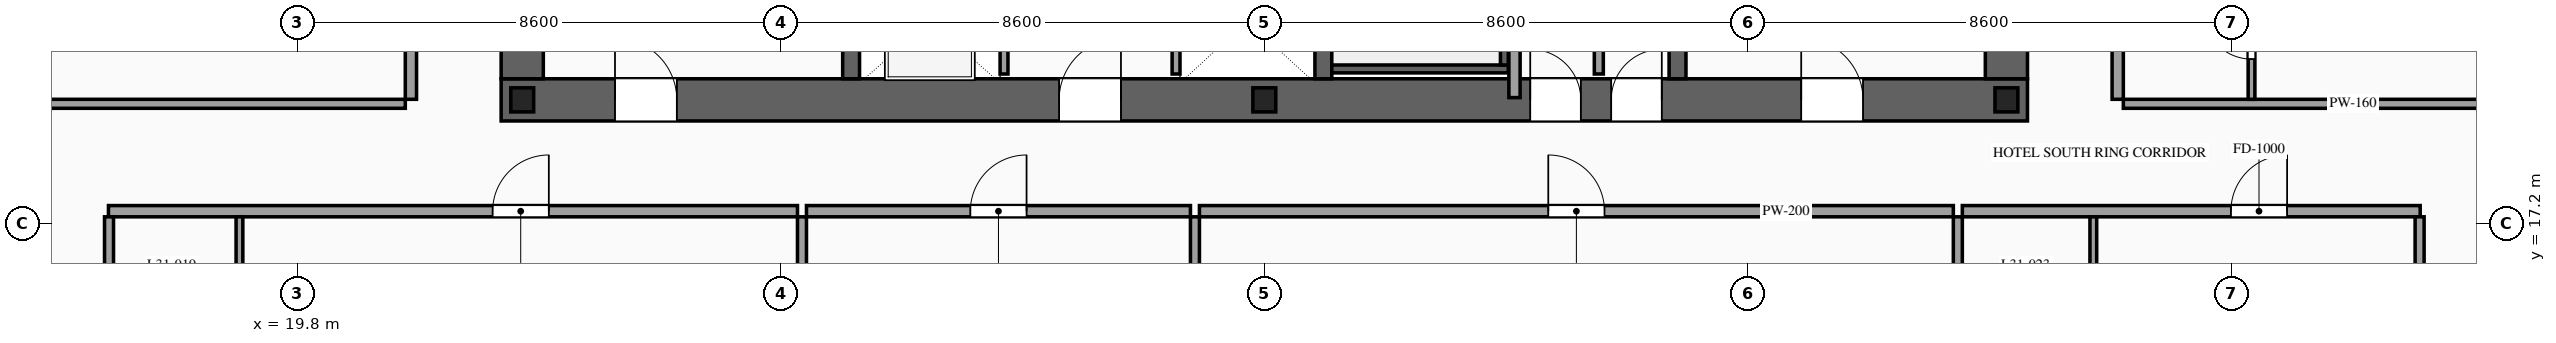
"""IFC4 building model, lengths in metres.
Left out: names, types, materials, properties, quantities, classifications, styles, units other than length and angle.
Written with IfcOpenShell. Run it as: python <this file> out.ifc"""

import sys

from ifc_helpers import new_model, si_unit, direction, frame, frame_2d, origin, origin_2d, place, context, subcontext, project, spatial, rectangle, i_section, extrude, source, transform, mapped, element, fill, save


model = new_model("IFC4")
c1 = context("Model", 3, precision=1e-05, world=origin(), true_north=direction((0.0, 1.0)))
c2 = subcontext(c1, "Body", "Model", "MODEL_VIEW")
j1 = project(units=[si_unit("LENGTHUNIT", "METRE"), si_unit("PLANEANGLEUNIT", "RADIAN")], contexts=[c1])
p1 = place(None, origin())
s1 = spatial("IfcSite", under=j1, at=p1, CompositionType="ELEMENT")
p2 = place(p1, origin())
s2 = spatial("IfcBuilding", under=s1, at=p2, CompositionType="ELEMENT")
p3 = place(p2, frame((0.0, 0.0, 119.0)))
s3 = spatial("IfcBuildingStorey", under=s2, at=p3, CompositionType="ELEMENT", Elevation=119.0)
p4 = place(p3, frame((23.425, 19.4, 0.0), z_axis=(0.0, 0.0, 1.0), x_axis=(1.0, 0.0, 0.0)))
e1 = element("IfcWall", 1, at=p4, inside=s3, PredefinedType="SHEAR", context=c2, shape_type="SweptSolid", body=[
    extrude(rectangle(XDim=27.15, YDim=0.75, at=frame_2d((13.575, 0.0))), origin(), (0.0, 0.0, 1.0), 3.6),
])
p5 = place(p4, frame((2.025, 0.0, 0.0)))
e2 = element("IfcOpeningElement", 2, at=p5, cuts=e1, PredefinedType="OPENING", context=c2, shape_type="SweptSolid", body=[
    extrude(rectangle(XDim=1.1, YDim=2.2, at=frame_2d((0.55, 1.1))), frame((0.0, 0.39, 0.0), z_axis=(0.0, -1.0, 0.0), x_axis=(1.0, 0.0, 0.0)), (0.0, 0.0, 1.0), 0.78),
])
p6 = place(p4, frame((9.925, 0.0, 0.0)))
e3 = element("IfcOpeningElement", 3, at=p6, cuts=e1, PredefinedType="OPENING", context=c2, shape_type="SweptSolid", body=[
    extrude(rectangle(XDim=1.1, YDim=2.2, at=frame_2d((0.55, 1.1))), frame((0.0, 0.39, 0.0), z_axis=(0.0, -1.0, 0.0), x_axis=(1.0, 0.0, 0.0)), (0.0, 0.0, 1.0), 0.78),
])
p7 = place(p4, frame((23.125, 0.0, 0.0)))
e4 = element("IfcOpeningElement", 4, at=p7, cuts=e1, PredefinedType="OPENING", context=c2, shape_type="SweptSolid", body=[
    extrude(rectangle(XDim=1.1, YDim=2.2, at=frame_2d((0.55, 1.1))), frame((0.0, 0.39, 0.0), z_axis=(0.0, -1.0, 0.0), x_axis=(1.0, 0.0, 0.0)), (0.0, 0.0, 1.0), 0.78),
])
p8 = place(p4, frame((19.745, 0.0, 0.0)))
e5 = element("IfcOpeningElement", 5, at=p8, cuts=e1, PredefinedType="OPENING", context=c2, shape_type="SweptSolid", body=[
    extrude(rectangle(XDim=0.9, YDim=2.15, at=frame_2d((0.45, 1.075))), frame((0.0, 0.39, 0.0), z_axis=(0.0, -1.0, 0.0), x_axis=(1.0, 0.0, 0.0)), (0.0, 0.0, 1.0), 0.78),
])
p9 = place(p4, frame((18.305, 0.0, 0.0)))
e6 = element("IfcOpeningElement", 6, at=p9, cuts=e1, PredefinedType="OPENING", context=c2, shape_type="SweptSolid", body=[
    extrude(rectangle(XDim=0.9, YDim=2.15, at=frame_2d((0.45, 1.075))), frame((0.0, 0.39, 0.0), z_axis=(0.0, -1.0, 0.0), x_axis=(1.0, 0.0, 0.0)), (0.0, 0.0, 1.0), 0.78),
])
m1 = source(origin(), c2, "Body", "SweptSolid", [
    extrude(rectangle(XDim=12.05, YDim=0.75, at=frame_2d((6.025, 0.0))), origin(), (0.0, 0.0, 1.0), 3.6),
])
for number, where, z_axis, x_axis in (
    (7, (23.8, 19.775, 0.0), (0.0, 0.0, 1.0), (0.0, 1.0, 0.0)),
    (8, (50.2, 19.775, 0.0), (0.0, 0.0, 1.0), (0.0, 1.0, 0.0)),
):
    element("IfcWall", number, at=place(p3, frame(where, z_axis=z_axis, x_axis=x_axis)), inside=s3, PredefinedType="SHEAR", context=c2, shape_type="MappedRepresentation", body=[
        mapped(m1, transform((0.0, 0.0, 0.0), scale=1.0)),
    ])
m2 = source(origin(), c2, "Body", "SweptSolid", [
    extrude(rectangle(XDim=12.05, YDim=0.3, at=frame_2d((6.025, 0.0))), origin(), (0.0, 0.0, 1.0), 3.6),
])
for number, where, z_axis, x_axis in (
    (9, (29.65, 19.775, 0.0), (0.0, 0.0, 1.0), (0.0, 1.0, 0.0)),
    (10, (38.05, 19.775, 0.0), (0.0, 0.0, 1.0), (0.0, 1.0, 0.0)),
    (11, (44.35, 19.775, 0.0), (0.0, 0.0, 1.0), (0.0, 1.0, 0.0)),
):
    element("IfcWall", number, at=place(p3, frame(where, z_axis=z_axis, x_axis=x_axis)), inside=s3, PredefinedType="SOLIDWALL", context=c2, shape_type="MappedRepresentation", body=[
        mapped(m2, transform((0.0, 0.0, 0.0), scale=1.0)),
    ])
m3 = source(origin(), c2, "Body", "SweptSolid", [
    extrude(i_section(OverallWidth=0.407, OverallDepth=0.428, WebThickness=0.02, FlangeThickness=0.035, at=origin_2d()), origin(), (0.0, 0.0, 1.0), 3.6),
])
for number, where, z_axis, x_axis in (
    (12, (23.8, 19.4, 0.0), (0.0, 0.0, 1.0), (1.0, 0.0, 0.0)),
    (13, (37.0, 19.4, 0.0), (0.0, 0.0, 1.0), (1.0, 0.0, 0.0)),
    (14, (50.2, 19.4, 0.0), (0.0, 0.0, 1.0), (1.0, 0.0, 0.0)),
):
    element("IfcColumn", number, at=place(p3, frame(where, z_axis=z_axis, x_axis=x_axis)), inside=s3, PredefinedType="COLUMN", context=c2, shape_type="MappedRepresentation", body=[
        mapped(m3, transform((0.0, 0.0, 0.0), scale=1.0)),
    ])
p10 = place(p3, frame((32.37, 19.86, 0.0), z_axis=(0.0, 0.0, 1.0), x_axis=(0.0, 1.0, 0.0)))
e15 = element("IfcWall", 15, at=p10, inside=s3, PredefinedType="SOLIDWALL", context=c2, shape_type="SweptSolid", body=[
    extrude(rectangle(XDim=2.04, YDim=0.14, at=frame_2d((1.02, 0.0))), origin(), (0.0, 0.0, 1.0), 3.38),
])
p11 = place(p10, frame((0.47, 0.0, 0.0)))
e16 = element("IfcOpeningElement", 16, at=p11, cuts=e15, PredefinedType="OPENING", context=c2, shape_type="SweptSolid", body=[
    extrude(rectangle(XDim=1.1, YDim=2.2, at=frame_2d((0.55, 1.1))), frame((0.0, 0.085, 0.0), z_axis=(0.0, -1.0, 0.0), x_axis=(1.0, 0.0, 0.0)), (0.0, 0.0, 1.0), 0.17),
])
m4 = source(origin(), c2, "Body", "SweptSolid", [
    extrude(rectangle(XDim=2.04, YDim=0.14, at=frame_2d((1.02, 0.0))), origin(), (0.0, 0.0, 1.0), 3.38),
])
p12 = place(p3, frame((35.43, 19.86, 0.0), z_axis=(0.0, 0.0, 1.0), x_axis=(0.0, 1.0, 0.0)))
e17 = element("IfcWall", 17, at=p12, inside=s3, PredefinedType="SOLIDWALL", context=c2, shape_type="MappedRepresentation", body=[
    mapped(m4, transform((0.0, 0.0, 0.0), scale=1.0)),
])
m5 = source(origin(), c2, "Body", "SweptSolid", [
    extrude(rectangle(XDim=3.14, YDim=0.14, at=frame_2d((1.57, 0.0))), origin(), (0.0, 0.0, 1.0), 3.38),
])
p13 = place(p3, frame((38.2, 19.95, 0.0), z_axis=(0.0, 0.0, 1.0), x_axis=(1.0, 0.0, 0.0)))
e18 = element("IfcWall", 18, at=p13, inside=s3, PredefinedType="SOLIDWALL", context=c2, shape_type="MappedRepresentation", body=[
    mapped(m5, transform((0.0, 0.0, 0.0), scale=1.0)),
])
m6 = source(origin(), c2, "Body", "SweptSolid", [
    extrude(rectangle(XDim=8.94, YDim=0.14, at=frame_2d((4.47, 0.0))), origin(), (0.0, 0.0, 1.0), 3.38),
])
p14 = place(p3, frame((41.27, 20.02, 0.0), z_axis=(0.0, 0.0, 1.0), x_axis=(0.0, 1.0, 0.0)))
e19 = element("IfcWall", 19, at=p14, inside=s3, PredefinedType="SOLIDWALL", context=c2, shape_type="MappedRepresentation", body=[
    mapped(m6, transform((0.0, 0.0, 0.0), scale=1.0)),
])
m7 = source(origin(), c2, "Body", "SweptSolid", [
    extrude(rectangle(XDim=1.34, YDim=0.16, at=frame_2d((0.67, 0.0))), origin(), (0.0, 0.0, 1.0), 3.38),
])
p15 = place(p3, frame((42.95, 19.86, 0.0), z_axis=(0.0, 0.0, 1.0), x_axis=(0.0, 1.0, 0.0)))
e20 = element("IfcWall", 20, at=p15, inside=s3, PredefinedType="PARTITIONING", context=c2, shape_type="MappedRepresentation", body=[
    mapped(m7, transform((0.0, 0.0, 0.0), scale=1.0)),
])
m8 = source(origin(), c2, "Body", "SweptSolid", [
    extrude(rectangle(XDim=6.51, YDim=0.2, at=frame_2d((3.255, 0.0))), origin(), (0.0, 0.0, 1.0), 3.38),
])
p16 = place(p3, frame((41.45, 19.44, 0.0), z_axis=(0.0, 0.0, 1.0), x_axis=(0.0, 1.0, 0.0)))
e21 = element("IfcWall", 21, at=p16, inside=s3, PredefinedType="PARTITIONING", context=c2, shape_type="MappedRepresentation", body=[
    mapped(m8, transform((0.0, 0.0, 0.0), scale=1.0)),
])
p17 = place(p3, frame((16.44, 17.42, 0.0), z_axis=(0.0, 0.0, 1.0), x_axis=(1.0, 0.0, 0.0)))
e22 = element("IfcWall", 22, at=p17, inside=s3, PredefinedType="PARTITIONING", context=c2, shape_type="SweptSolid", body=[
    extrude(rectangle(XDim=12.256, YDim=0.2, at=frame_2d((6.128, 0.0))), origin(), (0.0, 0.0, 1.0), 3.38),
])
p18 = place(p17, frame((6.833, 0.0, 0.0)))
e23 = element("IfcOpeningElement", 23, at=p18, cuts=e22, PredefinedType="OPENING", context=c2, shape_type="SweptSolid", body=[
    extrude(rectangle(XDim=1.0, YDim=2.2, at=frame_2d((0.5, 1.1))), frame((0.0, 0.115, 0.0), z_axis=(0.0, -1.0, 0.0), x_axis=(1.0, 0.0, 0.0)), (0.0, 0.0, 1.0), 0.23),
])
m9 = source(origin(), c2, "Body", "SweptSolid", [
    extrude(rectangle(XDim=14.97, YDim=0.16, at=frame_2d((7.485, 0.0))), origin(), (0.0, 0.0, 1.0), 3.38),
])
p19 = place(p3, frame((28.776, 2.35, 0.0), z_axis=(0.0, 0.0, 1.0), x_axis=(0.0, 1.0, 0.0)))
e24 = element("IfcWall", 24, at=p19, inside=s3, PredefinedType="PARTITIONING", context=c2, shape_type="MappedRepresentation", body=[
    mapped(m9, transform((0.0, 0.0, 0.0), scale=1.0)),
])
m10 = source(origin(), c2, "Body", "SweptSolid", [
    extrude(rectangle(XDim=2.42, YDim=0.12, at=frame_2d((1.21, 0.0))), origin(), (0.0, 0.0, 1.0), 3.38),
])
p20 = place(p3, frame((18.77, 14.9, 0.0), z_axis=(0.0, 0.0, 1.0), x_axis=(0.0, 1.0, 0.0)))
e25 = element("IfcWall", 25, at=p20, inside=s3, PredefinedType="PARTITIONING", context=c2, shape_type="MappedRepresentation", body=[
    mapped(m10, transform((0.0, 0.0, 0.0), scale=1.0)),
])
p21 = place(p3, frame((28.856, 17.42, 0.0), z_axis=(0.0, 0.0, 1.0), x_axis=(1.0, 0.0, 0.0)))
e26 = element("IfcWall", 26, at=p21, inside=s3, PredefinedType="PARTITIONING", context=c2, shape_type="SweptSolid", body=[
    extrude(rectangle(XDim=6.83, YDim=0.2, at=frame_2d((3.415, 0.0))), origin(), (0.0, 0.0, 1.0), 3.38),
])
p22 = place(p21, frame((2.915, 0.0, 0.0)))
e27 = element("IfcOpeningElement", 27, at=p22, cuts=e26, PredefinedType="OPENING", context=c2, shape_type="SweptSolid", body=[
    extrude(rectangle(XDim=1.0, YDim=2.2, at=frame_2d((0.5, 1.1))), frame((0.0, 0.115, 0.0), z_axis=(0.0, -1.0, 0.0), x_axis=(1.0, 0.0, 0.0)), (0.0, 0.0, 1.0), 0.23),
])
p23 = place(p3, frame((35.766, 2.35, 0.0), z_axis=(0.0, 0.0, 1.0), x_axis=(0.0, 1.0, 0.0)))
e28 = element("IfcWall", 28, at=p23, inside=s3, PredefinedType="PARTITIONING", context=c2, shape_type="MappedRepresentation", body=[
    mapped(m9, transform((0.0, 0.0, 0.0), scale=1.0)),
])
p24 = place(p3, frame((35.846, 17.42, 0.0), z_axis=(0.0, 0.0, 1.0), x_axis=(1.0, 0.0, 0.0)))
e29 = element("IfcWall", 29, at=p24, inside=s3, PredefinedType="PARTITIONING", context=c2, shape_type="SweptSolid", body=[
    extrude(rectangle(XDim=13.41, YDim=0.2, at=frame_2d((6.705, 0.0))), origin(), (0.0, 0.0, 1.0), 3.38),
])
p25 = place(p24, frame((6.205, 0.0, 0.0)))
e30 = element("IfcOpeningElement", 30, at=p25, cuts=e29, PredefinedType="OPENING", context=c2, shape_type="SweptSolid", body=[
    extrude(rectangle(XDim=1.0, YDim=2.2, at=frame_2d((0.5, 1.1))), frame((0.0, 0.115, 0.0), z_axis=(0.0, -1.0, 0.0), x_axis=(1.0, 0.0, 0.0)), (0.0, 0.0, 1.0), 0.23),
])
p26 = place(p3, frame((49.336, 2.35, 0.0), z_axis=(0.0, 0.0, 1.0), x_axis=(0.0, 1.0, 0.0)))
e31 = element("IfcWall", 31, at=p26, inside=s3, PredefinedType="PARTITIONING", context=c2, shape_type="MappedRepresentation", body=[
    mapped(m9, transform((0.0, 0.0, 0.0), scale=1.0)),
])
p27 = place(p3, frame((49.416, 17.42, 0.0), z_axis=(0.0, 0.0, 1.0), x_axis=(1.0, 0.0, 0.0)))
e32 = element("IfcWall", 32, at=p27, inside=s3, PredefinedType="PARTITIONING", context=c2, shape_type="SweptSolid", body=[
    extrude(rectangle(XDim=8.144, YDim=0.2, at=frame_2d((4.072, 0.0))), origin(), (0.0, 0.0, 1.0), 3.38),
])
p28 = place(p27, frame((4.777, 0.0, 0.0)))
e33 = element("IfcOpeningElement", 33, at=p28, cuts=e32, PredefinedType="OPENING", context=c2, shape_type="SweptSolid", body=[
    extrude(rectangle(XDim=1.0, YDim=2.2, at=frame_2d((0.5, 1.1))), frame((0.0, 0.115, 0.0), z_axis=(0.0, -1.0, 0.0), x_axis=(1.0, 0.0, 0.0)), (0.0, 0.0, 1.0), 0.23),
])
m11 = source(origin(), c2, "Body", "SweptSolid", [
    extrude(rectangle(XDim=14.82, YDim=0.16, at=frame_2d((7.41, 0.0))), origin(), (0.0, 0.0, 1.0), 3.38),
])
for number, where, z_axis, x_axis in (
    (34, (16.45, 2.5, 0.0), (0.0, 0.0, 1.0), (0.0, 1.0, 0.0)),
    (35, (57.55, 2.5, 0.0), (0.0, 0.0, 1.0), (0.0, 1.0, 0.0)),
):
    element("IfcWall", number, at=place(p3, frame(where, z_axis=z_axis, x_axis=x_axis)), inside=s3, PredefinedType="PARTITIONING", context=c2, shape_type="MappedRepresentation", body=[
        mapped(m11, transform((0.0, 0.0, 0.0), scale=1.0)),
    ])
p29 = place(p3, frame((51.746, 14.9, 0.0), z_axis=(0.0, 0.0, 1.0), x_axis=(0.0, 1.0, 0.0)))
e36 = element("IfcWall", 36, at=p29, inside=s3, PredefinedType="PARTITIONING", context=c2, shape_type="MappedRepresentation", body=[
    mapped(m10, transform((0.0, 0.0, 0.0), scale=1.0)),
])
p30 = place(p3, frame((21.82, 19.41, 0.0), z_axis=(0.0, 0.0, 1.0), x_axis=(0.0, 1.0, 0.0)))
e37 = element("IfcWall", 37, at=p30, inside=s3, PredefinedType="PARTITIONING", context=c2, shape_type="SweptSolid", body=[
    extrude(rectangle(XDim=12.78, YDim=0.2, at=frame_2d((6.39, 0.0))), origin(), (0.0, 0.0, 1.0), 3.38),
])
p31 = place(p30, frame((5.89, 0.0, 0.0)))
e38 = element("IfcOpeningElement", 38, at=p31, cuts=e37, PredefinedType="OPENING", context=c2, shape_type="SweptSolid", body=[
    extrude(rectangle(XDim=1.0, YDim=2.2, at=frame_2d((0.5, 1.1))), frame((0.0, 0.115, 0.0), z_axis=(0.0, -1.0, 0.0), x_axis=(1.0, 0.0, 0.0)), (0.0, 0.0, 1.0), 0.23),
])
m12 = source(origin(), c2, "Body", "SweptSolid", [
    extrude(rectangle(XDim=8.17, YDim=0.16, at=frame_2d((4.085, 0.0))), origin(), (0.0, 0.0, 1.0), 2.875),
])
p32 = place(p3, frame((13.55, 19.33, 0.0), z_axis=(0.0, 0.0, 1.0), x_axis=(1.0, 0.0, 0.0)))
e39 = element("IfcWall", 39, at=p32, inside=s3, PredefinedType="PARTITIONING", context=c2, shape_type="MappedRepresentation", body=[
    mapped(m12, transform((0.0, 0.0, 0.0), scale=1.0)),
])
p33 = place(p3, frame((52.18, 19.41, 0.0), z_axis=(0.0, 0.0, 1.0), x_axis=(0.0, 1.0, 0.0)))
e40 = element("IfcWall", 40, at=p33, inside=s3, PredefinedType="PARTITIONING", context=c2, shape_type="SweptSolid", body=[
    extrude(rectangle(XDim=6.31, YDim=0.2, at=frame_2d((3.155, 0.0))), origin(), (0.0, 0.0, 1.0), 3.38),
])
p34 = place(p33, frame((3.835, 0.0, 0.0)))
e41 = element("IfcOpeningElement", 41, at=p34, cuts=e40, PredefinedType="OPENING", context=c2, shape_type="SweptSolid", body=[
    extrude(rectangle(XDim=1.0, YDim=2.2, at=frame_2d((0.5, 1.1))), frame((0.0, 0.115, 0.0), z_axis=(0.0, -1.0, 0.0), x_axis=(1.0, 0.0, 0.0)), (0.0, 0.0, 1.0), 0.23),
])
p35 = place(p3, frame((52.28, 19.33, 0.0), z_axis=(0.0, 0.0, 1.0), x_axis=(1.0, 0.0, 0.0)))
e42 = element("IfcWall", 42, at=p35, inside=s3, PredefinedType="PARTITIONING", context=c2, shape_type="MappedRepresentation", body=[
    mapped(m12, transform((0.0, 0.0, 0.0), scale=1.0)),
])
p36 = place(p3, frame((54.56, 19.41, 0.0), z_axis=(0.0, 0.0, 1.0), x_axis=(0.0, 1.0, 0.0)))
e43 = element("IfcWall", 43, at=p36, inside=s3, PredefinedType="PARTITIONING", context=c2, shape_type="SweptSolid", body=[
    extrude(rectangle(XDim=2.28, YDim=0.12, at=frame_2d((1.14, 0.0))), origin(), (0.0, 0.0, 1.0), 3.38),
])
p37 = place(p36, frame((0.715, 0.0, 0.0)))
e44 = element("IfcOpeningElement", 44, at=p37, cuts=e43, PredefinedType="OPENING", context=c2, shape_type="SweptSolid", body=[
    extrude(rectangle(XDim=0.85, YDim=2.1, at=frame_2d((0.425, 1.05))), frame((0.0, 0.075, 0.0), z_axis=(0.0, -1.0, 0.0), x_axis=(1.0, 0.0, 0.0)), (0.0, 0.0, 1.0), 0.15),
])
m13 = source(origin(), c2, "Body", "SweptSolid", [
    extrude(rectangle(XDim=1.1, YDim=2.2, at=frame_2d((0.55, 1.1))), frame((0.0, 0.025, 0.0), z_axis=(0.0, -1.0, 0.0), x_axis=(1.0, 0.0, 0.0)), (0.0, 0.0, 1.0), 0.05),
])
p38 = place(p5, origin())
e45 = element("IfcDoor", 45, at=p38, inside=s3, OperationType="SINGLE_SWING_LEFT", PredefinedType="DOOR", context=c2, shape_type="MappedRepresentation", body=[
    mapped(m13, transform((0.0, 0.0, 0.0), scale=1.0)),
])
fill(e2, e45)
p39 = place(p6, origin())
e46 = element("IfcDoor", 46, at=p39, inside=s3, OperationType="SINGLE_SWING_RIGHT", PredefinedType="DOOR", context=c2, shape_type="MappedRepresentation", body=[
    mapped(m13, transform((0.0, 0.0, 0.0), scale=1.0)),
])
fill(e3, e46)
p40 = place(p7, origin())
e47 = element("IfcDoor", 47, at=p40, inside=s3, OperationType="SINGLE_SWING_LEFT", PredefinedType="DOOR", context=c2, shape_type="MappedRepresentation", body=[
    mapped(m13, transform((0.0, 0.0, 0.0), scale=1.0)),
])
fill(e4, e47)
m14 = source(origin(), c2, "Body", "SweptSolid", [
    extrude(rectangle(XDim=0.9, YDim=2.15, at=frame_2d((0.45, 1.075))), frame((0.0, 0.025, 0.0), z_axis=(0.0, -1.0, 0.0), x_axis=(1.0, 0.0, 0.0)), (0.0, 0.0, 1.0), 0.05),
])
p41 = place(p8, origin())
e48 = element("IfcDoor", 48, at=p41, inside=s3, OperationType="SINGLE_SWING_RIGHT", PredefinedType="DOOR", context=c2, shape_type="MappedRepresentation", body=[
    mapped(m14, transform((0.0, 0.0, 0.0), scale=1.0)),
])
fill(e5, e48)
p42 = place(p9, origin())
e49 = element("IfcDoor", 49, at=p42, inside=s3, OperationType="SINGLE_SWING_LEFT", PredefinedType="DOOR", context=c2, shape_type="MappedRepresentation", body=[
    mapped(m14, transform((0.0, 0.0, 0.0), scale=1.0)),
])
fill(e6, e49)
m15 = source(origin(), c2, "Body", "SweptSolid", [
    extrude(rectangle(XDim=1.0, YDim=2.2, at=frame_2d((0.5, 1.1))), frame((0.0, 0.025, 0.0), z_axis=(0.0, -1.0, 0.0), x_axis=(1.0, 0.0, 0.0)), (0.0, 0.0, 1.0), 0.05),
])
p43 = place(p18, origin())
e50 = element("IfcDoor", 50, at=p43, inside=s3, OperationType="SINGLE_SWING_RIGHT", PredefinedType="DOOR", context=c2, shape_type="MappedRepresentation", body=[
    mapped(m15, transform((0.0, 0.0, 0.0), scale=1.0)),
])
fill(e23, e50)
p44 = place(p22, origin())
e51 = element("IfcDoor", 51, at=p44, inside=s3, OperationType="SINGLE_SWING_RIGHT", PredefinedType="DOOR", context=c2, shape_type="MappedRepresentation", body=[
    mapped(m15, transform((0.0, 0.0, 0.0), scale=1.0)),
])
fill(e27, e51)
p45 = place(p25, origin())
e52 = element("IfcDoor", 52, at=p45, inside=s3, OperationType="SINGLE_SWING_LEFT", PredefinedType="DOOR", context=c2, shape_type="MappedRepresentation", body=[
    mapped(m15, transform((0.0, 0.0, 0.0), scale=1.0)),
])
fill(e30, e52)
p46 = place(p28, origin())
e53 = element("IfcDoor", 53, at=p46, inside=s3, OperationType="SINGLE_SWING_RIGHT", PredefinedType="DOOR", context=c2, shape_type="MappedRepresentation", body=[
    mapped(m15, transform((0.0, 0.0, 0.0), scale=1.0)),
])
fill(e33, e53)
m16 = source(origin(), c2, "Body", "SweptSolid", [
    extrude(rectangle(XDim=0.85, YDim=2.1, at=frame_2d((0.425, 1.05))), frame((0.0, 0.025, 0.0), z_axis=(0.0, -1.0, 0.0), x_axis=(1.0, 0.0, 0.0)), (0.0, 0.0, 1.0), 0.05),
])
p47 = place(p37, origin())
e54 = element("IfcDoor", 54, at=p47, inside=s3, OperationType="SINGLE_SWING_RIGHT", PredefinedType="DOOR", context=c2, shape_type="MappedRepresentation", body=[
    mapped(m16, transform((0.0, 0.0, 0.0), scale=1.0)),
])
fill(e44, e54)
save(model, sys.argv[1])
